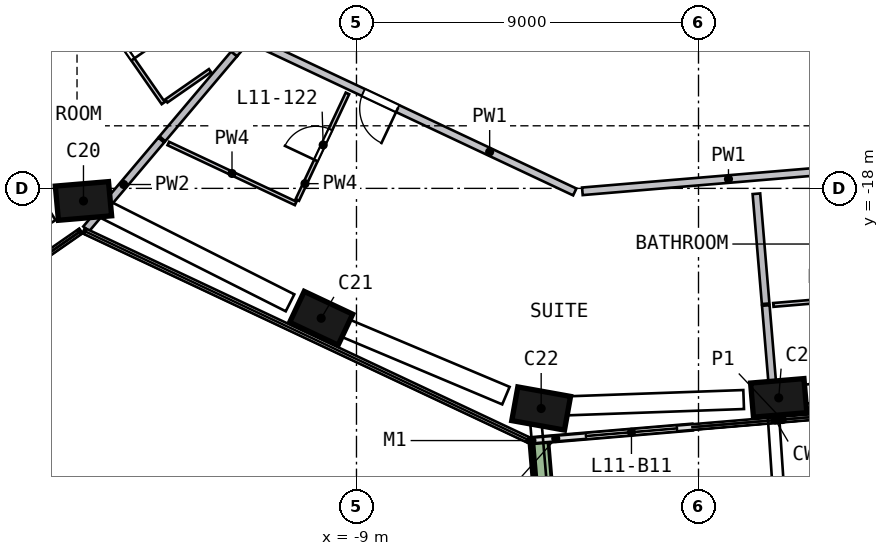
"""IFC4 building model, lengths in metres.
Left out: names, types, materials, properties, quantities, classifications, styles, units other than length and angle.
Written with IfcOpenShell. Run it as: python <this file> out.ifc"""

import sys

from ifc_helpers import new_model, si_unit, direction, frame, frame_2d, origin, origin_2d, place, context, subcontext, project, spatial, rectangle, extrude, element, fill, save


model = new_model("IFC4")
c1 = context("Model", 3, precision=1e-05, world=origin(), true_north=direction((0.0, 1.0)))
c2 = subcontext(c1, "Body", "Model", "MODEL_VIEW")
j1 = project(units=[si_unit("LENGTHUNIT", "METRE"), si_unit("PLANEANGLEUNIT", "RADIAN")], contexts=[c1])
p1 = place(None, origin())
s1 = spatial("IfcSite", under=j1, at=p1, CompositionType="ELEMENT")
p2 = place(p1, origin())
s2 = spatial("IfcBuilding", under=s1, at=p2, CompositionType="ELEMENT")
p3 = place(p2, frame((0.0, 0.0, 53.0)))
s3 = spatial("IfcBuildingStorey", under=s2, at=p3, CompositionType="ELEMENT", Elevation=53.0)
p4 = place(p3, frame((-16.289, -18.239, 0.0), z_axis=(0.087342051, -0.076699852, 0.993221274), x_axis=(-0.992681372, -0.090169645, 0.080331373)))
e1 = element("IfcColumn", 1, at=p4, inside=s3, PredefinedType="COLUMN", context=c2, shape_type="SweptSolid", body=[
    extrude(rectangle(XDim=1.4, YDim=0.9, at=origin_2d()), origin(), (0.0, 0.0, 1.0), 3.212),
])
p5 = place(p3, frame((-10.052, -21.362, 0.0), z_axis=(0.10198402, -0.046923296, 0.993678753), x_axis=(0.899155521, -0.422986653, -0.112257027)))
e2 = element("IfcColumn", 2, at=p5, inside=s3, PredefinedType="COLUMN", context=c2, shape_type="SweptSolid", body=[
    extrude(rectangle(XDim=1.4, YDim=0.9, at=origin_2d()), origin(), (0.0, 0.0, 1.0), 3.21),
])
p6 = place(p3, frame((-4.277, -23.77, 0.0), z_axis=(0.113205755, -0.019387151, 0.993382401), x_axis=(-0.977669596, 0.17598777, 0.114849756)))
e3 = element("IfcColumn", 3, at=p6, inside=s3, PredefinedType="COLUMN", context=c2, shape_type="SweptSolid", body=[
    extrude(rectangle(XDim=1.4, YDim=0.9, at=origin_2d()), origin(), (0.0, 0.0, 1.0), 3.211),
])
p7 = place(p3, frame((1.976, -23.525, 0.0), z_axis=(0.111794513, 0.010266843, 0.993678307), x_axis=(0.990250205, 0.082474278, -0.11226097)))
e4 = element("IfcColumn", 4, at=p7, inside=s3, PredefinedType="COLUMN", context=c2, shape_type="SweptSolid", body=[
    extrude(rectangle(XDim=1.4, YDim=0.9, at=origin_2d()), origin(), (0.0, 0.0, 1.0), 3.21),
])
p8 = place(p3, frame((-4.354, -24.634, 0.0), z_axis=(0.0, 0.0, 1.0), x_axis=(0.996493025, 0.083675875, 0.0)))
e5 = element("IfcWall", 5, at=p8, inside=s3, PredefinedType="SOLIDWALL", context=c2, shape_type="SweptSolid", body=[
    extrude(rectangle(XDim=4.198, YDim=0.15, at=frame_2d((2.099, 0.0))), origin(), (0.0, 0.0, 1.0), 2.425),
])
p9 = place(p8, frame((1.399, 0.0, 0.0)))
e6 = element("IfcOpeningElement", 6, at=p9, cuts=e5, PredefinedType="OPENING", context=c2, shape_type="SweptSolid", body=[
    extrude(rectangle(XDim=2.4, YDim=2.4, at=frame_2d((1.2, 1.2))), frame((0.0, 0.085, 0.0), z_axis=(0.0, -1.0, 0.0), x_axis=(1.0, 0.0, 0.0)), (0.0, 0.0, 1.0), 0.17),
])
p10 = place(p3, frame((-4.198, -24.697, 0.0), z_axis=(0.0, 0.0, 1.0), x_axis=(0.083645489, -0.996495576, 0.0)))
e7 = element("IfcWall", 7, at=p10, inside=s3, PredefinedType="SOLIDWALL", context=c2, shape_type="SweptSolid", body=[
    extrude(rectangle(XDim=3.199, YDim=0.5, at=frame_2d((1.6, 0.0))), origin(), (0.0, 0.0, 1.0), 0.7),
])
p11 = place(p3, frame((-26.832, -17.309, 0.0), z_axis=(0.0, 0.0, 1.0), x_axis=(0.821145147, 0.570719412, 0.0)))
e8 = element("IfcWall", 8, at=p11, inside=s3, PredefinedType="SOLIDWALL", context=c2, shape_type="SweptSolid", body=[
    extrude(rectangle(XDim=13.953, YDim=0.2, at=frame_2d((6.977, 0.0))), origin(), (0.0, 0.0, 1.0), 3.19),
])
p12 = place(p11, frame((6.1, 0.0, 0.0)))
e9 = element("IfcOpeningElement", 9, at=p12, cuts=e8, PredefinedType="OPENING", context=c2, shape_type="SweptSolid", body=[
    extrude(rectangle(XDim=1.0, YDim=2.1, at=frame_2d((0.5, 1.05))), frame((0.0, 0.11, 0.0), z_axis=(0.0, -1.0, 0.0), x_axis=(1.0, 0.0, 0.0)), (0.0, 0.0, 1.0), 0.22),
])
p13 = place(p3, frame((-14.119, -11.152, 0.0), z_axis=(0.0, 0.0, 1.0), x_axis=(-0.821153348, -0.570707613, 0.0)))
e10 = element("IfcWall", 10, at=p13, inside=s3, PredefinedType="SOLIDWALL", context=c2, shape_type="SweptSolid", body=[
    extrude(rectangle(XDim=13.953, YDim=0.2, at=frame_2d((6.976, 0.0))), origin(), (0.0, 0.0, 1.0), 3.19),
])
p14 = place(p13, frame((12.266, 0.0, 0.0)))
e11 = element("IfcOpeningElement", 11, at=p14, cuts=e10, PredefinedType="OPENING", context=c2, shape_type="SweptSolid", body=[
    extrude(rectangle(XDim=0.9, YDim=2.1, at=frame_2d((0.45, 1.05))), frame((0.0, 0.11, 0.0), z_axis=(0.0, -1.0, 0.0), x_axis=(1.0, 0.0, 0.0)), (0.0, 0.0, 1.0), 0.22),
])
p15 = place(p13, frame((6.85, 0.0, 0.0)))
e12 = element("IfcOpeningElement", 12, at=p15, cuts=e10, PredefinedType="OPENING", context=c2, shape_type="SweptSolid", body=[
    extrude(rectangle(XDim=1.0, YDim=2.1, at=frame_2d((0.5, 1.05))), frame((0.0, 0.11, 0.0), z_axis=(0.0, -1.0, 0.0), x_axis=(1.0, 0.0, 0.0)), (0.0, 0.0, 1.0), 0.22),
])
p16 = place(p3, frame((-3.256, -18.094, 0.0), z_axis=(0.0, 0.0, 1.0), x_axis=(-0.904828798, 0.425775581, 0.0)))
e13 = element("IfcWall", 13, at=p16, inside=s3, PredefinedType="SOLIDWALL", context=c2, shape_type="SweptSolid", body=[
    extrude(rectangle(XDim=9.316, YDim=0.2, at=frame_2d((4.658, 0.0))), origin(), (0.0, 0.0, 1.0), 3.19),
])
p17 = place(p16, frame((5.15, 0.0, 0.0)))
e14 = element("IfcOpeningElement", 14, at=p17, cuts=e13, PredefinedType="OPENING", context=c2, shape_type="SweptSolid", body=[
    extrude(rectangle(XDim=1.0, YDim=2.1, at=frame_2d((0.5, 1.05))), frame((0.0, 0.11, 0.0), z_axis=(0.0, -1.0, 0.0), x_axis=(1.0, 0.0, 0.0)), (0.0, 0.0, 1.0), 0.22),
])
p18 = place(p3, frame((6.028, -17.315, 0.0), z_axis=(0.0, 0.0, 1.0), x_axis=(-0.996493661, -0.083668294, 0.0)))
e15 = element("IfcWall", 15, at=p18, inside=s3, PredefinedType="SOLIDWALL", context=c2, shape_type="SweptSolid", body=[
    extrude(rectangle(XDim=9.116, YDim=0.2, at=frame_2d((4.558, 0.0))), origin(), (0.0, 0.0, 1.0), 3.19),
])
p19 = place(p18, frame((0.2, 0.0, 0.0)))
e16 = element("IfcOpeningElement", 16, at=p19, cuts=e15, PredefinedType="OPENING", context=c2, shape_type="SweptSolid", body=[
    extrude(rectangle(XDim=1.0, YDim=2.1, at=frame_2d((0.5, 1.05))), frame((0.0, 0.11, 0.0), z_axis=(0.0, -1.0, 0.0), x_axis=(1.0, 0.0, 0.0)), (0.0, 0.0, 1.0), 0.22),
])
p20 = place(p3, frame((-14.137, -16.729, 0.0), z_axis=(0.0, 0.0, 1.0), x_axis=(-0.645495257, -0.763764279, 0.0)))
e17 = element("IfcWall", 17, at=p20, inside=s3, PredefinedType="SOLIDWALL", context=c2, shape_type="SweptSolid", body=[
    extrude(rectangle(XDim=3.061, YDim=0.2, at=frame_2d((1.531, 0.0))), origin(), (0.0, 0.0, 1.0), 3.19),
])
p21 = place(p3, frame((-12.22, -14.46, 0.0), z_axis=(0.0, 0.0, 1.0), x_axis=(-0.645440667, -0.763810412, 0.0)))
e18 = element("IfcWall", 18, at=p21, inside=s3, PredefinedType="SOLIDWALL", context=c2, shape_type="SweptSolid", body=[
    extrude(rectangle(XDim=2.925, YDim=0.2, at=frame_2d((1.462, 0.0))), origin(), (0.0, 0.0, 1.0), 3.19),
])
p22 = place(p3, frame((-12.026, -14.23, 0.0), z_axis=(0.0, 0.0, 1.0), x_axis=(-0.645833123, -0.763478603, 0.0)))
e19 = element("IfcWall", 19, at=p22, inside=s3, PredefinedType="SOLIDWALL", context=c2, shape_type="SweptSolid", body=[
    extrude(rectangle(XDim=0.301, YDim=0.2, at=frame_2d((0.15, 0.0))), origin(), (0.0, 0.0, 1.0), 3.19),
])
p23 = place(p3, frame((1.523, -18.142, 0.0), z_axis=(0.0, 0.0, 1.0), x_axis=(0.083706209, -0.996490477, 0.0)))
e20 = element("IfcWall", 20, at=p23, inside=s3, PredefinedType="SOLIDWALL", context=c2, shape_type="SweptSolid", body=[
    extrude(rectangle(XDim=2.905, YDim=0.2, at=frame_2d((1.453, 0.0))), origin(), (0.0, 0.0, 1.0), 3.19),
])
p24 = place(p3, frame((1.77, -21.082, 0.0), z_axis=(0.0, 0.0, 1.0), x_axis=(0.083695681, -0.996491361, 0.0)))
e21 = element("IfcWall", 21, at=p24, inside=s3, PredefinedType="SOLIDWALL", context=c2, shape_type="SweptSolid", body=[
    extrude(rectangle(XDim=2.952, YDim=0.2, at=frame_2d((1.476, 0.0))), origin(), (0.0, 0.0, 1.0), 3.19),
])
p25 = place(p3, frame((-16.139, -12.8, 0.0), z_axis=(0.0, 0.0, 1.0), x_axis=(0.570669018, -0.82118017, 0.0)))
e22 = element("IfcWall", 22, at=p25, inside=s3, PredefinedType="PARTITIONING", context=c2, shape_type="SweptSolid", body=[
    extrude(rectangle(XDim=3.6, YDim=0.1, at=frame_2d((1.8, 0.0))), origin(), (0.0, 0.0, 1.0), 3.19),
])
p26 = place(p25, frame((1.2, 0.0, 0.0)))
e23 = element("IfcOpeningElement", 23, at=p26, cuts=e22, PredefinedType="OPENING", context=c2, shape_type="SweptSolid", body=[
    extrude(rectangle(XDim=1.0, YDim=2.1, at=frame_2d((0.5, 1.05))), frame((0.0, 0.06, 0.0), z_axis=(0.0, -1.0, 0.0), x_axis=(1.0, 0.0, 0.0)), (0.0, 0.0, 1.0), 0.12),
])
p27 = place(p3, frame((-12.854, -14.901, 0.0), z_axis=(0.0, 0.0, 1.0), x_axis=(-0.821122219, -0.570752399, 0.0)))
e24 = element("IfcWall", 24, at=p27, inside=s3, PredefinedType="PARTITIONING", context=c2, shape_type="SweptSolid", body=[
    extrude(rectangle(XDim=1.398, YDim=0.1, at=frame_2d((0.699, 0.0))), origin(), (0.0, 0.0, 1.0), 3.19),
])
p28 = place(p3, frame((-10.6, -18.396, 0.0), z_axis=(0.0, 0.0, 1.0), x_axis=(-0.904812727, 0.425809734, 0.0)))
e25 = element("IfcWall", 25, at=p28, inside=s3, PredefinedType="PARTITIONING", context=c2, shape_type="SweptSolid", body=[
    extrude(rectangle(XDim=3.704, YDim=0.1, at=frame_2d((1.852, 0.0))), origin(), (0.0, 0.0, 1.0), 3.19),
])
p29 = place(p3, frame((-10.557, -18.305, 0.0), z_axis=(0.0, 0.0, 1.0), x_axis=(0.425759108, 0.90483655, 0.0)))
e26 = element("IfcWall", 26, at=p29, inside=s3, PredefinedType="PARTITIONING", context=c2, shape_type="SweptSolid", body=[
    extrude(rectangle(XDim=3.1, YDim=0.1, at=frame_2d((1.55, 0.0))), origin(), (0.0, 0.0, 1.0), 3.19),
])
p30 = place(p29, frame((1.15, 0.0, 0.0)))
e27 = element("IfcOpeningElement", 27, at=p30, cuts=e26, PredefinedType="OPENING", context=c2, shape_type="SweptSolid", body=[
    extrude(rectangle(XDim=0.9, YDim=2.1, at=frame_2d((0.45, 1.05))), frame((0.0, 0.06, 0.0), z_axis=(0.0, -1.0, 0.0), x_axis=(1.0, 0.0, 0.0)), (0.0, 0.0, 1.0), 0.12),
])
p31 = place(p3, frame((4.66, -20.842, 0.0), z_axis=(0.0, 0.0, 1.0), x_axis=(-0.996496321, -0.083636612, 0.0)))
e28 = element("IfcWall", 28, at=p31, inside=s3, PredefinedType="PARTITIONING", context=c2, shape_type="SweptSolid", body=[
    extrude(rectangle(XDim=2.7, YDim=0.1, at=frame_2d((1.35, 0.0))), origin(), (0.0, 0.0, 1.0), 3.19),
])
p32 = place(p9, origin())
e29 = element("IfcDoor", 29, at=p32, inside=s3, OperationType="SLIDING_TO_LEFT", PredefinedType="DOOR", context=c2, shape_type="SweptSolid", body=[
    extrude(rectangle(XDim=2.4, YDim=2.4, at=frame_2d((1.2, 1.2))), frame((0.0, 0.025, 0.0), z_axis=(0.0, -1.0, 0.0), x_axis=(1.0, 0.0, 0.0)), (0.0, 0.0, 1.0), 0.05),
])
fill(e6, e29)
p33 = place(p26, origin())
e30 = element("IfcDoor", 30, at=p33, inside=s3, OperationType="SINGLE_SWING_RIGHT", PredefinedType="DOOR", context=c2, shape_type="SweptSolid", body=[
    extrude(rectangle(XDim=1.0, YDim=2.1, at=frame_2d((0.5, 1.05))), frame((0.0, 0.025, 0.0), z_axis=(0.0, -1.0, 0.0), x_axis=(1.0, 0.0, 0.0)), (0.0, 0.0, 1.0), 0.05),
])
fill(e23, e30)
p34 = place(p17, origin())
e31 = element("IfcDoor", 31, at=p34, inside=s3, OperationType="SINGLE_SWING_LEFT", PredefinedType="DOOR", context=c2, shape_type="SweptSolid", body=[
    extrude(rectangle(XDim=1.0, YDim=2.1, at=frame_2d((0.5, 1.05))), frame((0.0, 0.025, 0.0), z_axis=(0.0, -1.0, 0.0), x_axis=(1.0, 0.0, 0.0)), (0.0, 0.0, 1.0), 0.05),
])
fill(e14, e31)
p35 = place(p30, origin())
e32 = element("IfcDoor", 32, at=p35, inside=s3, OperationType="SINGLE_SWING_LEFT", PredefinedType="DOOR", context=c2, shape_type="SweptSolid", body=[
    extrude(rectangle(XDim=0.9, YDim=2.1, at=frame_2d((0.45, 1.05))), frame((0.0, 0.025, 0.0), z_axis=(0.0, -1.0, 0.0), x_axis=(1.0, 0.0, 0.0)), (0.0, 0.0, 1.0), 0.05),
])
fill(e27, e32)
save(model, sys.argv[1])
